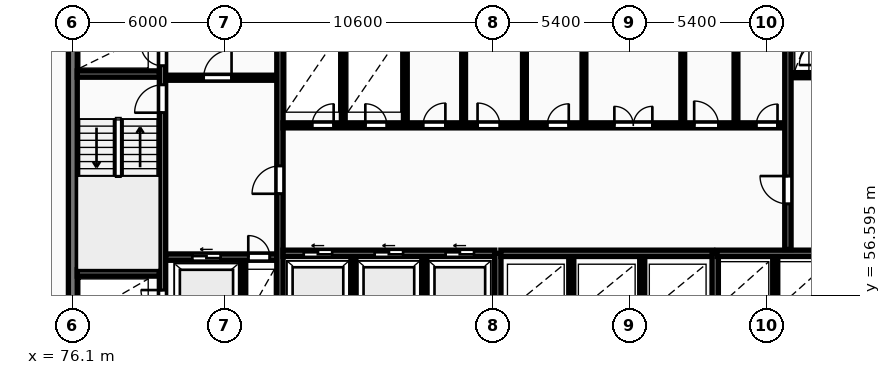
"""IFC4 building model, lengths in metres.
Left out: names, types, materials, properties, quantities, classifications, styles, units other than length and angle.
Written with IfcOpenShell. Run it as: python <this file> out.ifc"""

import sys

from ifc_helpers import new_model, si_unit, direction, frame, frame_2d, origin, place, context, subcontext, project, spatial, rectangle, extrude, element, fill, save


model = new_model("IFC4")
c1 = context("Model", 3, precision=1e-05, world=origin(), true_north=direction((0.0, 1.0)))
c2 = subcontext(c1, "Body", "Model", "MODEL_VIEW")
j1 = project(units=[si_unit("LENGTHUNIT", "METRE"), si_unit("PLANEANGLEUNIT", "RADIAN")], contexts=[c1])
p1 = place(None, origin())
s1 = spatial("IfcSite", under=j1, at=p1, CompositionType="ELEMENT")
p2 = place(p1, origin())
s2 = spatial("IfcBuilding", under=s1, at=p2, CompositionType="ELEMENT")
p3 = place(p2, frame((0.0, 0.0, 80.8)))
s3 = spatial("IfcBuildingStorey", under=s2, at=p3, CompositionType="ELEMENT", Elevation=80.8)
p4 = place(p3, frame((76.125, 55.375, 0.0), z_axis=(0.0, 0.0, 1.0), x_axis=(0.0, 1.0, 0.0)))
e1 = element("IfcWall", 1, at=p4, inside=s3, PredefinedType="SHEAR", context=c2, shape_type="SweptSolid", body=[
    extrude(rectangle(XDim=11.65, YDim=0.35, at=frame_2d((5.825, 0.0))), origin(), (0.0, 0.0, 1.0), 3.25),
])
p5 = place(p3, frame((79.665, 55.4, 0.0), z_axis=(0.0, 0.0, 1.0), x_axis=(0.0, 1.0, 0.0)))
e2 = element("IfcWall", 2, at=p5, inside=s3, PredefinedType="SHEAR", context=c2, shape_type="SweptSolid", body=[
    extrude(rectangle(XDim=11.6, YDim=0.25, at=frame_2d((5.8, 0.0))), origin(), (0.0, 0.0, 1.0), 3.25),
])
p6 = place(p5, frame((0.55, 0.0, 0.0)))
e3 = element("IfcOpeningElement", 3, at=p6, cuts=e2, PredefinedType="OPENING", context=c2, shape_type="SweptSolid", body=[
    extrude(rectangle(XDim=0.85, YDim=2.05, at=frame_2d((0.425, 1.025))), frame((0.0, 0.135, 0.0), z_axis=(0.0, -1.0, 0.0), x_axis=(1.0, 0.0, 0.0)), (0.0, 0.0, 1.0), 0.27),
])
p7 = place(p5, frame((8.4, 0.0, 0.0)))
e4 = element("IfcOpeningElement", 4, at=p7, cuts=e2, PredefinedType="OPENING", context=c2, shape_type="SweptSolid", body=[
    extrude(rectangle(XDim=1.1, YDim=2.1, at=frame_2d((0.55, 1.05))), frame((0.0, 0.135, 0.0), z_axis=(0.0, -1.0, 0.0), x_axis=(1.0, 0.0, 0.0)), (0.0, 0.0, 1.0), 0.27),
])
p8 = place(p5, frame((10.25, 0.0, 0.0)))
e5 = element("IfcOpeningElement", 5, at=p8, cuts=e2, PredefinedType="OPENING", context=c2, shape_type="SweptSolid", body=[
    extrude(rectangle(XDim=0.85, YDim=2.05, at=frame_2d((0.425, 1.025))), frame((0.0, 0.135, 0.0), z_axis=(0.0, -1.0, 0.0), x_axis=(1.0, 0.0, 0.0)), (0.0, 0.0, 1.0), 0.27),
])
for number, where, z_axis, x_axis in (
    (6, (76.3, 57.475, 0.0), (0.0, 0.0, 1.0), (1.0, 0.0, 0.0)),
    (7, (76.3, 65.325, 0.0), (0.0, 0.0, 1.0), (1.0, 0.0, 0.0)),
):
    element("IfcWall", number, at=place(p3, frame(where, z_axis=z_axis, x_axis=x_axis)), inside=s3, PredefinedType="SHEAR", context=c2, shape_type="SweptSolid", body=[
        extrude(rectangle(XDim=3.24, YDim=0.25, at=frame_2d((1.62, 0.0))), origin(), (0.0, 0.0, 1.0), 3.25),
    ])
p9 = place(p3, frame((79.79, 58.1, 0.0), z_axis=(0.0, 0.0, 1.0), x_axis=(1.0, 0.0, 0.0)))
e8 = element("IfcWall", 8, at=p9, inside=s3, PredefinedType="SHEAR", context=c2, shape_type="SweptSolid", body=[
    extrude(rectangle(XDim=4.39, YDim=0.25, at=frame_2d((2.195, 0.0))), origin(), (0.0, 0.0, 1.0), 3.25),
])
p10 = place(p9, frame((1.05, 0.0, 0.0)))
e9 = element("IfcOpeningElement", 9, at=p10, cuts=e8, PredefinedType="OPENING", context=c2, shape_type="SweptSolid", body=[
    extrude(rectangle(XDim=1.12, YDim=2.12, at=frame_2d((0.56, 1.06))), frame((0.0, 0.135, 0.0), z_axis=(0.0, -1.0, 0.0), x_axis=(1.0, 0.0, 0.0)), (0.0, 0.0, 1.0), 0.27),
])
p11 = place(p9, frame((3.26, 0.0, 0.0)))
e10 = element("IfcOpeningElement", 10, at=p11, cuts=e8, PredefinedType="OPENING", context=c2, shape_type="SweptSolid", body=[
    extrude(rectangle(XDim=0.85, YDim=2.05, at=frame_2d((0.425, 1.025))), frame((0.0, 0.135, 0.0), z_axis=(0.0, -1.0, 0.0), x_axis=(1.0, 0.0, 0.0)), (0.0, 0.0, 1.0), 0.27),
])
p12 = place(p3, frame((82.85, 55.4, 0.0), z_axis=(0.0, 0.0, 1.0), x_axis=(0.0, 1.0, 0.0)))
e11 = element("IfcWall", 11, at=p12, inside=s3, PredefinedType="PARTITIONING", context=c2, shape_type="SweptSolid", body=[
    extrude(rectangle(XDim=2.56, YDim=0.2, at=frame_2d((1.28, 0.0))), origin(), (0.0, 0.0, 1.0), 2.97),
])
p13 = place(p3, frame((79.79, 65.18, 0.0), z_axis=(0.0, 0.0, 1.0), x_axis=(1.0, 0.0, 0.0)))
e12 = element("IfcWall", 12, at=p13, inside=s3, PredefinedType="PARTITIONING", context=c2, shape_type="SweptSolid", body=[
    extrude(rectangle(XDim=4.39, YDim=0.2, at=frame_2d((2.195, 0.0))), origin(), (0.0, 0.0, 1.0), 2.97),
])
p14 = place(p13, frame((1.5, 0.0, 0.0)))
e13 = element("IfcOpeningElement", 13, at=p14, cuts=e12, PredefinedType="OPENING", context=c2, shape_type="SweptSolid", body=[
    extrude(rectangle(XDim=1.1, YDim=2.1, at=frame_2d((0.55, 1.05))), frame((0.0, 0.11, 0.0), z_axis=(0.0, -1.0, 0.0), x_axis=(1.0, 0.0, 0.0)), (0.0, 0.0, 1.0), 0.22),
])
p15 = place(p3, frame((84.3, 55.4, 0.0), z_axis=(0.0, 0.0, 1.0), x_axis=(0.0, 1.0, 0.0)))
e14 = element("IfcWall", 14, at=p15, inside=s3, PredefinedType="SHEAR", context=c2, shape_type="SweptSolid", body=[
    extrude(rectangle(XDim=11.6, YDim=0.25, at=frame_2d((5.8, 0.0))), origin(), (0.0, 0.0, 1.0), 3.25),
])
p16 = place(p15, frame((5.2, 0.0, 0.0)))
e15 = element("IfcOpeningElement", 15, at=p16, cuts=e14, PredefinedType="OPENING", context=c2, shape_type="SweptSolid", body=[
    extrude(rectangle(XDim=1.1, YDim=2.1, at=frame_2d((0.55, 1.05))), frame((0.0, 0.135, 0.0), z_axis=(0.0, -1.0, 0.0), x_axis=(1.0, 0.0, 0.0)), (0.0, 0.0, 1.0), 0.27),
])
for number, where, z_axis, x_axis in (
    (16, (87.2, 55.4, 0.0), (0.0, 0.0, 1.0), (0.0, 1.0, 0.0)),
    (17, (90.0, 55.4, 0.0), (0.0, 0.0, 1.0), (0.0, 1.0, 0.0)),
):
    element("IfcWall", number, at=place(p3, frame(where, z_axis=z_axis, x_axis=x_axis)), inside=s3, PredefinedType="PARTITIONING", context=c2, shape_type="SweptSolid", body=[
        extrude(rectangle(XDim=2.72, YDim=0.2, at=frame_2d((1.36, 0.0))), origin(), (0.0, 0.0, 1.0), 2.97),
    ])
p17 = place(p3, frame((84.42, 58.25, 0.0), z_axis=(0.0, 0.0, 1.0), x_axis=(1.0, 0.0, 0.0)))
e18 = element("IfcWall", 18, at=p17, inside=s3, PredefinedType="SHEAR", context=c2, shape_type="SweptSolid", body=[
    extrude(rectangle(XDim=8.36, YDim=0.25, at=frame_2d((4.18, 0.0))), origin(), (0.0, 0.0, 1.0), 3.25),
])
p18 = place(p17, frame((0.82, 0.0, 0.0)))
e19 = element("IfcOpeningElement", 19, at=p18, cuts=e18, PredefinedType="OPENING", context=c2, shape_type="SweptSolid", body=[
    extrude(rectangle(XDim=1.12, YDim=2.12, at=frame_2d((0.56, 1.06))), frame((0.0, 0.135, 0.0), z_axis=(0.0, -1.0, 0.0), x_axis=(1.0, 0.0, 0.0)), (0.0, 0.0, 1.0), 0.27),
])
p19 = place(p17, frame((3.62, 0.0, 0.0)))
e20 = element("IfcOpeningElement", 20, at=p19, cuts=e18, PredefinedType="OPENING", context=c2, shape_type="SweptSolid", body=[
    extrude(rectangle(XDim=1.12, YDim=2.12, at=frame_2d((0.56, 1.06))), frame((0.0, 0.135, 0.0), z_axis=(0.0, -1.0, 0.0), x_axis=(1.0, 0.0, 0.0)), (0.0, 0.0, 1.0), 0.27),
])
p20 = place(p17, frame((6.42, 0.0, 0.0)))
e21 = element("IfcOpeningElement", 21, at=p20, cuts=e18, PredefinedType="OPENING", context=c2, shape_type="SweptSolid", body=[
    extrude(rectangle(XDim=1.12, YDim=2.12, at=frame_2d((0.56, 1.06))), frame((0.0, 0.135, 0.0), z_axis=(0.0, -1.0, 0.0), x_axis=(1.0, 0.0, 0.0)), (0.0, 0.0, 1.0), 0.27),
])
p21 = place(p3, frame((92.9, 55.4, 0.0), z_axis=(0.0, 0.0, 1.0), x_axis=(0.0, 1.0, 0.0)))
e22 = element("IfcWall", 22, at=p21, inside=s3, PredefinedType="SHEAR", context=c2, shape_type="SweptSolid", body=[
    extrude(rectangle(XDim=2.85, YDim=0.25, at=frame_2d((1.425, 0.0))), origin(), (0.0, 0.0, 1.0), 3.25),
])
for number, where, z_axis, x_axis in (
    (23, (95.8, 55.4, 0.0), (0.0, 0.0, 1.0), (0.0, 1.0, 0.0)),
    (24, (98.6, 55.4, 0.0), (0.0, 0.0, 1.0), (0.0, 1.0, 0.0)),
):
    element("IfcWall", number, at=place(p3, frame(where, z_axis=z_axis, x_axis=x_axis)), inside=s3, PredefinedType="PARTITIONING", context=c2, shape_type="SweptSolid", body=[
        extrude(rectangle(XDim=2.72, YDim=0.2, at=frame_2d((1.36, 0.0))), origin(), (0.0, 0.0, 1.0), 2.97),
    ])
p22 = place(p3, frame((93.02, 58.25, 0.0), z_axis=(0.0, 0.0, 1.0), x_axis=(1.0, 0.0, 0.0)))
e25 = element("IfcWall", 25, at=p22, inside=s3, PredefinedType="SHEAR", context=c2, shape_type="SweptSolid", body=[
    extrude(rectangle(XDim=8.36, YDim=0.25, at=frame_2d((4.18, 0.0))), origin(), (0.0, 0.0, 1.0), 3.25),
])
p23 = place(p3, frame((101.48, 55.4, 0.0), z_axis=(0.0, 0.0, 1.0), x_axis=(0.0, 1.0, 0.0)))
e26 = element("IfcWall", 26, at=p23, inside=s3, PredefinedType="SHEAR", context=c2, shape_type="SweptSolid", body=[
    extrude(rectangle(XDim=2.85, YDim=0.25, at=frame_2d((1.425, 0.0))), origin(), (0.0, 0.0, 1.0), 3.25),
])
p24 = place(p3, frame((103.85, 55.4, 0.0), z_axis=(0.0, 0.0, 1.0), x_axis=(0.0, 1.0, 0.0)))
e27 = element("IfcWall", 27, at=p24, inside=s3, PredefinedType="PARTITIONING", context=c2, shape_type="SweptSolid", body=[
    extrude(rectangle(XDim=2.72, YDim=0.2, at=frame_2d((1.36, 0.0))), origin(), (0.0, 0.0, 1.0), 2.97),
])
p25 = place(p3, frame((101.55, 58.25, 0.0), z_axis=(0.0, 0.0, 1.0), x_axis=(1.0, 0.0, 0.0)))
e28 = element("IfcWall", 28, at=p25, inside=s3, PredefinedType="SHEAR", context=c2, shape_type="SweptSolid", body=[
    extrude(rectangle(XDim=4.6, YDim=0.25, at=frame_2d((2.3, 0.0))), origin(), (0.0, 0.0, 1.0), 3.25),
])
for number, where, z_axis, x_axis in (
    (29, (86.8, 63.4, 0.0), (0.0, 0.0, 1.0), (0.0, 1.0, 0.0)),
    (30, (89.25, 63.4, 0.0), (0.0, 0.0, 1.0), (0.0, 1.0, 0.0)),
    (31, (91.55, 63.4, 0.0), (0.0, 0.0, 1.0), (0.0, 1.0, 0.0)),
):
    element("IfcWall", number, at=place(p3, frame(where, z_axis=z_axis, x_axis=x_axis)), inside=s3, PredefinedType="PARTITIONING", context=c2, shape_type="SweptSolid", body=[
        extrude(rectangle(XDim=3.6, YDim=0.15, at=frame_2d((1.8, 0.0))), origin(), (0.0, 0.0, 1.0), 2.97),
    ])
p26 = place(p3, frame((93.95, 63.4, 0.0), z_axis=(0.0, 0.0, 1.0), x_axis=(0.0, 1.0, 0.0)))
e32 = element("IfcWall", 32, at=p26, inside=s3, PredefinedType="PARTITIONING", context=c2, shape_type="SweptSolid", body=[
    extrude(rectangle(XDim=3.6, YDim=0.15, at=frame_2d((1.8, 0.0))), origin(), (0.0, 0.0, 1.0), 2.277),
])
for number, where, z_axis, x_axis in (
    (33, (102.3, 63.4, 0.0), (0.0, 0.0, 1.0), (0.0, 1.0, 0.0)),
    (34, (96.3, 63.4, 0.0), (0.0, 0.0, 1.0), (0.0, 1.0, 0.0)),
    (35, (100.2, 63.4, 0.0), (0.0, 0.0, 1.0), (0.0, 1.0, 0.0)),
):
    element("IfcWall", number, at=place(p3, frame(where, z_axis=z_axis, x_axis=x_axis)), inside=s3, PredefinedType="PARTITIONING", context=c2, shape_type="SweptSolid", body=[
        extrude(rectangle(XDim=3.6, YDim=0.15, at=frame_2d((1.8, 0.0))), origin(), (0.0, 0.0, 1.0), 2.97),
    ])
p27 = place(p3, frame((84.42, 63.3, 0.0), z_axis=(0.0, 0.0, 1.0), x_axis=(1.0, 0.0, 0.0)))
e36 = element("IfcWall", 36, at=p27, inside=s3, PredefinedType="PARTITIONING", context=c2, shape_type="SweptSolid", body=[
    extrude(rectangle(XDim=19.83, YDim=0.2, at=frame_2d((9.915, 0.0))), origin(), (0.0, 0.0, 1.0), 2.97),
])
p28 = place(p27, frame((1.15, 0.0, 0.0)))
e37 = element("IfcOpeningElement", 37, at=p28, cuts=e36, PredefinedType="OPENING", context=c2, shape_type="SweptSolid", body=[
    extrude(rectangle(XDim=0.85, YDim=2.05, at=frame_2d((0.425, 1.025))), frame((0.0, 0.11, 0.0), z_axis=(0.0, -1.0, 0.0), x_axis=(1.0, 0.0, 0.0)), (0.0, 0.0, 1.0), 0.22),
])
p29 = place(p27, frame((3.25, 0.0, 0.0)))
e38 = element("IfcOpeningElement", 38, at=p29, cuts=e36, PredefinedType="OPENING", context=c2, shape_type="SweptSolid", body=[
    extrude(rectangle(XDim=0.85, YDim=2.05, at=frame_2d((0.425, 1.025))), frame((0.0, 0.11, 0.0), z_axis=(0.0, -1.0, 0.0), x_axis=(1.0, 0.0, 0.0)), (0.0, 0.0, 1.0), 0.22),
])
p30 = place(p27, frame((13.08, 0.0, 0.0)))
e39 = element("IfcOpeningElement", 39, at=p30, cuts=e36, PredefinedType="OPENING", context=c2, shape_type="SweptSolid", body=[
    extrude(rectangle(XDim=1.5, YDim=2.2, at=frame_2d((0.75, 1.1))), frame((0.0, 0.11, 0.0), z_axis=(0.0, -1.0, 0.0), x_axis=(1.0, 0.0, 0.0)), (0.0, 0.0, 1.0), 0.22),
])
p31 = place(p27, frame((5.53, 0.0, 0.0)))
e40 = element("IfcOpeningElement", 40, at=p31, cuts=e36, PredefinedType="OPENING", context=c2, shape_type="SweptSolid", body=[
    extrude(rectangle(XDim=0.88, YDim=2.06, at=frame_2d((0.44, 1.03))), frame((0.0, 0.11, 0.0), z_axis=(0.0, -1.0, 0.0), x_axis=(1.0, 0.0, 0.0)), (0.0, 0.0, 1.0), 0.22),
])
p32 = place(p27, frame((7.68, 0.0, 0.0)))
e41 = element("IfcOpeningElement", 41, at=p32, cuts=e36, PredefinedType="OPENING", context=c2, shape_type="SweptSolid", body=[
    extrude(rectangle(XDim=0.88, YDim=2.06, at=frame_2d((0.44, 1.03))), frame((0.0, 0.11, 0.0), z_axis=(0.0, -1.0, 0.0), x_axis=(1.0, 0.0, 0.0)), (0.0, 0.0, 1.0), 0.22),
])
p33 = place(p27, frame((10.43, 0.0, 0.0)))
e42 = element("IfcOpeningElement", 42, at=p33, cuts=e36, PredefinedType="OPENING", context=c2, shape_type="SweptSolid", body=[
    extrude(rectangle(XDim=0.85, YDim=2.05, at=frame_2d((0.425, 1.025))), frame((0.0, 0.11, 0.0), z_axis=(0.0, -1.0, 0.0), x_axis=(1.0, 0.0, 0.0)), (0.0, 0.0, 1.0), 0.22),
])
p34 = place(p27, frame((16.23, 0.0, 0.0)))
e43 = element("IfcOpeningElement", 43, at=p34, cuts=e36, PredefinedType="OPENING", context=c2, shape_type="SweptSolid", body=[
    extrude(rectangle(XDim=0.96, YDim=2.1, at=frame_2d((0.48, 1.05))), frame((0.0, 0.11, 0.0), z_axis=(0.0, -1.0, 0.0), x_axis=(1.0, 0.0, 0.0)), (0.0, 0.0, 1.0), 0.22),
])
p35 = place(p27, frame((18.68, 0.0, 0.0)))
e44 = element("IfcOpeningElement", 44, at=p35, cuts=e36, PredefinedType="OPENING", context=c2, shape_type="SweptSolid", body=[
    extrude(rectangle(XDim=0.84, YDim=2.04, at=frame_2d((0.42, 1.02))), frame((0.0, 0.11, 0.0), z_axis=(0.0, -1.0, 0.0), x_axis=(1.0, 0.0, 0.0)), (0.0, 0.0, 1.0), 0.22),
])
p36 = place(p3, frame((104.45, 65.28, 0.0), z_axis=(0.0, 0.0, 1.0), x_axis=(1.0, 0.0, 0.0)))
e45 = element("IfcWall", 45, at=p36, inside=s3, PredefinedType="PARTITIONING", context=c2, shape_type="SweptSolid", body=[
    extrude(rectangle(XDim=1.2, YDim=0.2, at=frame_2d((0.6, 0.0))), origin(), (0.0, 0.0, 1.0), 2.97),
])
p37 = place(p3, frame((104.35, 58.4, 0.0), z_axis=(0.0, 0.0, 1.0), x_axis=(0.0, 1.0, 0.0)))
e46 = element("IfcWall", 46, at=p37, inside=s3, PredefinedType="SHEAR", context=c2, shape_type="SweptSolid", body=[
    extrude(rectangle(XDim=8.6, YDim=0.25, at=frame_2d((4.3, 0.0))), origin(), (0.0, 0.0, 1.0), 3.25),
])
p38 = place(p37, frame((1.8, 0.0, 0.0)))
e47 = element("IfcOpeningElement", 47, at=p38, cuts=e46, PredefinedType="OPENING", context=c2, shape_type="SweptSolid", body=[
    extrude(rectangle(XDim=1.1, YDim=2.1, at=frame_2d((0.55, 1.05))), frame((0.0, 0.135, 0.0), z_axis=(0.0, -1.0, 0.0), x_axis=(1.0, 0.0, 0.0)), (0.0, 0.0, 1.0), 0.27),
])
p39 = place(p6, origin())
e48 = element("IfcDoor", 48, at=p39, inside=s3, OperationType="SINGLE_SWING_RIGHT", PredefinedType="DOOR", context=c2, shape_type="SweptSolid", body=[
    extrude(rectangle(XDim=0.85, YDim=2.05, at=frame_2d((0.425, 1.025))), frame((0.0, 0.025, 0.0), z_axis=(0.0, -1.0, 0.0), x_axis=(1.0, 0.0, 0.0)), (0.0, 0.0, 1.0), 0.05),
])
fill(e3, e48)
p40 = place(p7, origin())
e49 = element("IfcDoor", 49, at=p40, inside=s3, OperationType="SINGLE_SWING_LEFT", PredefinedType="DOOR", context=c2, shape_type="SweptSolid", body=[
    extrude(rectangle(XDim=1.1, YDim=2.1, at=frame_2d((0.55, 1.05))), frame((0.0, 0.025, 0.0), z_axis=(0.0, -1.0, 0.0), x_axis=(1.0, 0.0, 0.0)), (0.0, 0.0, 1.0), 0.05),
])
fill(e4, e49)
p41 = place(p8, origin())
e50 = element("IfcDoor", 50, at=p41, inside=s3, OperationType="SINGLE_SWING_RIGHT", PredefinedType="DOOR", context=c2, shape_type="SweptSolid", body=[
    extrude(rectangle(XDim=0.85, YDim=2.05, at=frame_2d((0.425, 1.025))), frame((0.0, 0.025, 0.0), z_axis=(0.0, -1.0, 0.0), x_axis=(1.0, 0.0, 0.0)), (0.0, 0.0, 1.0), 0.05),
])
fill(e5, e50)
p42 = place(p10, origin())
e51 = element("IfcDoor", 51, at=p42, inside=s3, OperationType="SLIDING_TO_LEFT", PredefinedType="DOOR", context=c2, shape_type="SweptSolid", body=[
    extrude(rectangle(XDim=1.12, YDim=2.12, at=frame_2d((0.56, 1.06))), frame((0.0, 0.025, 0.0), z_axis=(0.0, -1.0, 0.0), x_axis=(1.0, 0.0, 0.0)), (0.0, 0.0, 1.0), 0.05),
])
fill(e9, e51)
p43 = place(p11, origin())
e52 = element("IfcDoor", 52, at=p43, inside=s3, OperationType="SINGLE_SWING_LEFT", PredefinedType="DOOR", context=c2, shape_type="SweptSolid", body=[
    extrude(rectangle(XDim=0.85, YDim=2.05, at=frame_2d((0.425, 1.025))), frame((0.0, 0.025, 0.0), z_axis=(0.0, -1.0, 0.0), x_axis=(1.0, 0.0, 0.0)), (0.0, 0.0, 1.0), 0.05),
])
fill(e10, e52)
p44 = place(p14, origin())
e53 = element("IfcDoor", 53, at=p44, inside=s3, OperationType="SINGLE_SWING_RIGHT", PredefinedType="DOOR", context=c2, shape_type="SweptSolid", body=[
    extrude(rectangle(XDim=1.1, YDim=2.1, at=frame_2d((0.55, 1.05))), frame((0.0, 0.025, 0.0), z_axis=(0.0, -1.0, 0.0), x_axis=(1.0, 0.0, 0.0)), (0.0, 0.0, 1.0), 0.05),
])
fill(e13, e53)
p45 = place(p16, origin())
e54 = element("IfcDoor", 54, at=p45, inside=s3, OperationType="SINGLE_SWING_LEFT", PredefinedType="DOOR", context=c2, shape_type="SweptSolid", body=[
    extrude(rectangle(XDim=1.1, YDim=2.1, at=frame_2d((0.55, 1.05))), frame((0.0, 0.025, 0.0), z_axis=(0.0, -1.0, 0.0), x_axis=(1.0, 0.0, 0.0)), (0.0, 0.0, 1.0), 0.05),
])
fill(e15, e54)
p46 = place(p18, origin())
e55 = element("IfcDoor", 55, at=p46, inside=s3, OperationType="SLIDING_TO_LEFT", PredefinedType="DOOR", context=c2, shape_type="SweptSolid", body=[
    extrude(rectangle(XDim=1.12, YDim=2.12, at=frame_2d((0.56, 1.06))), frame((0.0, 0.025, 0.0), z_axis=(0.0, -1.0, 0.0), x_axis=(1.0, 0.0, 0.0)), (0.0, 0.0, 1.0), 0.05),
])
fill(e19, e55)
p47 = place(p19, origin())
e56 = element("IfcDoor", 56, at=p47, inside=s3, OperationType="SLIDING_TO_LEFT", PredefinedType="DOOR", context=c2, shape_type="SweptSolid", body=[
    extrude(rectangle(XDim=1.12, YDim=2.12, at=frame_2d((0.56, 1.06))), frame((0.0, 0.025, 0.0), z_axis=(0.0, -1.0, 0.0), x_axis=(1.0, 0.0, 0.0)), (0.0, 0.0, 1.0), 0.05),
])
fill(e20, e56)
p48 = place(p20, origin())
e57 = element("IfcDoor", 57, at=p48, inside=s3, OperationType="SLIDING_TO_LEFT", PredefinedType="DOOR", context=c2, shape_type="SweptSolid", body=[
    extrude(rectangle(XDim=1.12, YDim=2.12, at=frame_2d((0.56, 1.06))), frame((0.0, 0.025, 0.0), z_axis=(0.0, -1.0, 0.0), x_axis=(1.0, 0.0, 0.0)), (0.0, 0.0, 1.0), 0.05),
])
fill(e21, e57)
p49 = place(p28, origin())
e58 = element("IfcDoor", 58, at=p49, inside=s3, OperationType="SINGLE_SWING_RIGHT", PredefinedType="DOOR", context=c2, shape_type="SweptSolid", body=[
    extrude(rectangle(XDim=0.85, YDim=2.05, at=frame_2d((0.425, 1.025))), frame((0.0, 0.025, 0.0), z_axis=(0.0, -1.0, 0.0), x_axis=(1.0, 0.0, 0.0)), (0.0, 0.0, 1.0), 0.05),
])
fill(e37, e58)
p50 = place(p29, origin())
e59 = element("IfcDoor", 59, at=p50, inside=s3, OperationType="SINGLE_SWING_LEFT", PredefinedType="DOOR", context=c2, shape_type="SweptSolid", body=[
    extrude(rectangle(XDim=0.85, YDim=2.05, at=frame_2d((0.425, 1.025))), frame((0.0, 0.025, 0.0), z_axis=(0.0, -1.0, 0.0), x_axis=(1.0, 0.0, 0.0)), (0.0, 0.0, 1.0), 0.05),
])
fill(e38, e59)
p51 = place(p30, origin())
e60 = element("IfcDoor", 60, at=p51, inside=s3, OperationType="DOUBLE_DOOR_SINGLE_SWING", PredefinedType="DOOR", context=c2, shape_type="SweptSolid", body=[
    extrude(rectangle(XDim=1.5, YDim=2.2, at=frame_2d((0.75, 1.1))), frame((0.0, 0.025, 0.0), z_axis=(0.0, -1.0, 0.0), x_axis=(1.0, 0.0, 0.0)), (0.0, 0.0, 1.0), 0.05),
])
fill(e39, e60)
p52 = place(p31, origin())
e61 = element("IfcDoor", 61, at=p52, inside=s3, OperationType="SINGLE_SWING_RIGHT", PredefinedType="DOOR", context=c2, shape_type="SweptSolid", body=[
    extrude(rectangle(XDim=0.88, YDim=2.06, at=frame_2d((0.44, 1.03))), frame((0.0, 0.025, 0.0), z_axis=(0.0, -1.0, 0.0), x_axis=(1.0, 0.0, 0.0)), (0.0, 0.0, 1.0), 0.05),
])
fill(e40, e61)
p53 = place(p32, origin())
e62 = element("IfcDoor", 62, at=p53, inside=s3, OperationType="SINGLE_SWING_LEFT", PredefinedType="DOOR", context=c2, shape_type="SweptSolid", body=[
    extrude(rectangle(XDim=0.88, YDim=2.06, at=frame_2d((0.44, 1.03))), frame((0.0, 0.025, 0.0), z_axis=(0.0, -1.0, 0.0), x_axis=(1.0, 0.0, 0.0)), (0.0, 0.0, 1.0), 0.05),
])
fill(e41, e62)
p54 = place(p33, origin())
e63 = element("IfcDoor", 63, at=p54, inside=s3, OperationType="SINGLE_SWING_RIGHT", PredefinedType="DOOR", context=c2, shape_type="SweptSolid", body=[
    extrude(rectangle(XDim=0.85, YDim=2.05, at=frame_2d((0.425, 1.025))), frame((0.0, 0.025, 0.0), z_axis=(0.0, -1.0, 0.0), x_axis=(1.0, 0.0, 0.0)), (0.0, 0.0, 1.0), 0.05),
])
fill(e42, e63)
p55 = place(p34, origin())
e64 = element("IfcDoor", 64, at=p55, inside=s3, OperationType="SINGLE_SWING_LEFT", PredefinedType="DOOR", context=c2, shape_type="SweptSolid", body=[
    extrude(rectangle(XDim=0.96, YDim=2.1, at=frame_2d((0.48, 1.05))), frame((0.0, 0.025, 0.0), z_axis=(0.0, -1.0, 0.0), x_axis=(1.0, 0.0, 0.0)), (0.0, 0.0, 1.0), 0.05),
])
fill(e43, e64)
p56 = place(p35, origin())
e65 = element("IfcDoor", 65, at=p56, inside=s3, OperationType="SINGLE_SWING_RIGHT", PredefinedType="DOOR", context=c2, shape_type="SweptSolid", body=[
    extrude(rectangle(XDim=0.84, YDim=2.04, at=frame_2d((0.42, 1.02))), frame((0.0, 0.025, 0.0), z_axis=(0.0, -1.0, 0.0), x_axis=(1.0, 0.0, 0.0)), (0.0, 0.0, 1.0), 0.05),
])
fill(e44, e65)
p57 = place(p38, origin())
e66 = element("IfcDoor", 66, at=p57, inside=s3, OperationType="SINGLE_SWING_RIGHT", PredefinedType="DOOR", context=c2, shape_type="SweptSolid", body=[
    extrude(rectangle(XDim=1.1, YDim=2.1, at=frame_2d((0.55, 1.05))), frame((0.0, 0.025, 0.0), z_axis=(0.0, -1.0, 0.0), x_axis=(1.0, 0.0, 0.0)), (0.0, 0.0, 1.0), 0.05),
])
fill(e47, e66)
save(model, sys.argv[1])
